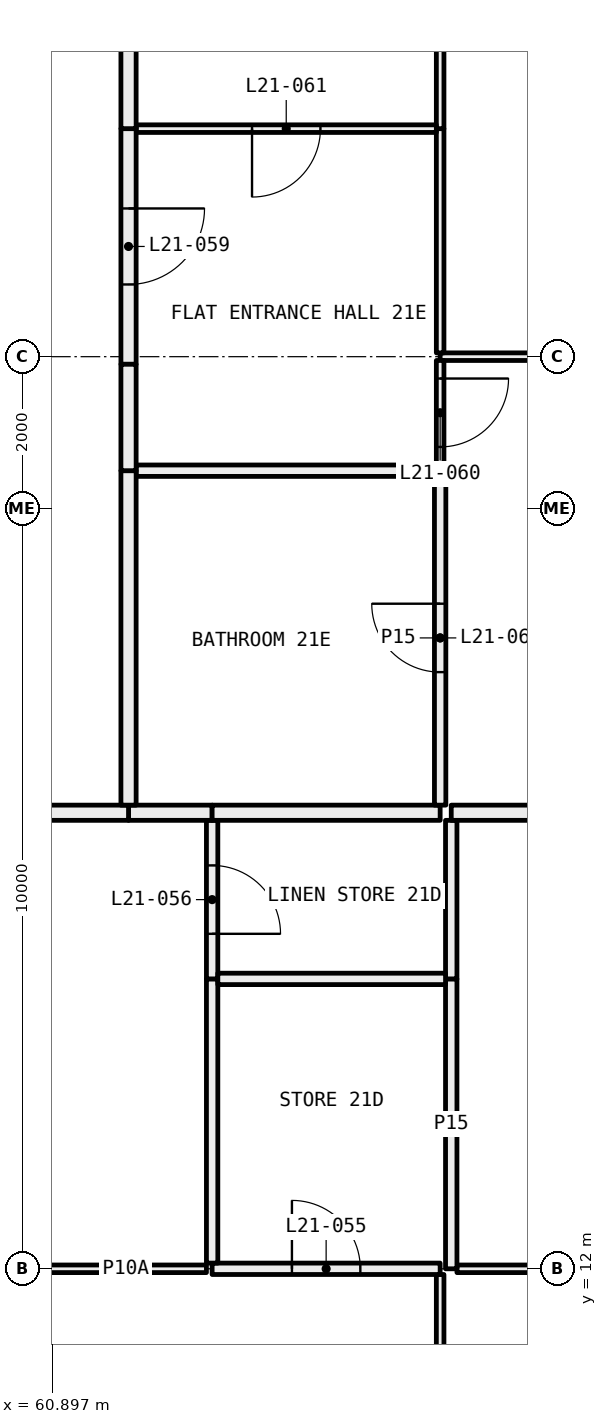
"""IFC4 building model, lengths in metres.
Left out: names, types, materials, properties, quantities, classifications, styles, units other than length and angle.
Written with IfcOpenShell. Run it as: python <this file> out.ifc"""

import sys

from ifc_helpers import new_model, si_unit, direction, frame, frame_2d, origin, place, context, subcontext, project, spatial, rectangle, extrude, element, fill, save


model = new_model("IFC4")
c1 = context("Model", 3, precision=1e-05, world=origin(), true_north=direction((0.0, 1.0)))
c2 = subcontext(c1, "Body", "Model", "MODEL_VIEW")
j1 = project(units=[si_unit("LENGTHUNIT", "METRE"), si_unit("PLANEANGLEUNIT", "RADIAN")], contexts=[c1])
p1 = place(None, origin())
s1 = spatial("IfcSite", under=j1, at=p1, CompositionType="ELEMENT")
p2 = place(p1, origin())
s2 = spatial("IfcBuilding", under=s1, at=p2, CompositionType="ELEMENT")
p3 = place(p2, frame((0.0, 0.0, 85.2)))
s3 = spatial("IfcBuildingStorey", under=s2, at=p3, CompositionType="ELEMENT", Elevation=85.2)
p4 = place(p3, frame((66.0, 6.72, 0.0), z_axis=(0.0, 0.0, 1.0), x_axis=(0.0, 1.0, 0.0)))
e1 = element("IfcWall", 1, at=p4, inside=s3, PredefinedType="PARTITIONING", context=c2, shape_type="SweptSolid", body=[
    extrude(rectangle(XDim=5.205, YDim=0.1, at=frame_2d((2.603, 0.0))), origin(), (0.0, 0.0, 1.0), 2.45),
])
p5 = place(p4, frame((2.153, 0.0, 0.0)))
e2 = element("IfcOpeningElement", 2, at=p5, cuts=e1, PredefinedType="OPENING", context=c2, shape_type="SweptSolid", body=[
    extrude(rectangle(XDim=0.9, YDim=2.1, at=frame_2d((0.45, 1.05))), frame((0.0, 0.06, 0.0), z_axis=(0.0, -1.0, 0.0), x_axis=(1.0, 0.0, 0.0)), (0.0, 0.0, 1.0), 0.12),
])
p6 = place(p3, frame((62.925, 12.0, 0.0), z_axis=(0.0, 0.0, 1.0), x_axis=(-1.0, 0.0, 0.0)))
e3 = element("IfcWall", 3, at=p6, inside=s3, PredefinedType="PARTITIONING", context=c2, shape_type="SweptSolid", body=[
    extrude(rectangle(XDim=2.125, YDim=0.1, at=frame_2d((1.062, 0.0))), origin(), (0.0, 0.0, 1.0), 2.45),
])
p7 = place(p3, frame((66.0, 12.0, 0.0), z_axis=(0.0, 0.0, 1.0), x_axis=(-1.0, 0.0, 0.0)))
e4 = element("IfcWall", 4, at=p7, inside=s3, PredefinedType="PARTITIONING", context=c2, shape_type="SweptSolid", body=[
    extrude(rectangle(XDim=3.0, YDim=0.15, at=frame_2d((1.5, 0.0))), origin(), (0.0, 0.0, 1.0), 2.45),
])
p8 = place(p7, frame((1.05, 0.0, 0.0)))
e5 = element("IfcOpeningElement", 5, at=p8, cuts=e4, PredefinedType="OPENING", context=c2, shape_type="SweptSolid", body=[
    extrude(rectangle(XDim=0.9, YDim=2.1, at=frame_2d((0.45, 1.05))), frame((0.0, 0.085, 0.0), z_axis=(0.0, -1.0, 0.0), x_axis=(1.0, 0.0, 0.0)), (0.0, 0.0, 1.0), 0.17),
])
p9 = place(p3, frame((71.28, 12.0, 0.0), z_axis=(0.0, 0.0, 1.0), x_axis=(-1.0, 0.0, 0.0)))
e6 = element("IfcWall", 6, at=p9, inside=s3, PredefinedType="PARTITIONING", context=c2, shape_type="SweptSolid", body=[
    extrude(rectangle(XDim=5.059, YDim=0.1, at=frame_2d((2.53, 0.0))), origin(), (0.0, 0.0, 1.0), 2.45),
])
p10 = place(p9, frame((2.08, 0.0, 0.0)))
e7 = element("IfcOpeningElement", 7, at=p10, cuts=e6, PredefinedType="OPENING", context=c2, shape_type="SweptSolid", body=[
    extrude(rectangle(XDim=0.9, YDim=2.1, at=frame_2d((0.45, 1.05))), frame((0.0, 0.06, 0.0), z_axis=(0.0, -1.0, 0.0), x_axis=(1.0, 0.0, 0.0)), (0.0, 0.0, 1.0), 0.12),
])
p11 = place(p3, frame((63.0, 12.075, 0.0), z_axis=(0.0, 0.0, 1.0), x_axis=(0.0, 1.0, 0.0)))
e8 = element("IfcWall", 8, at=p11, inside=s3, PredefinedType="PARTITIONING", context=c2, shape_type="SweptSolid", body=[
    extrude(rectangle(XDim=3.739, YDim=0.15, at=frame_2d((1.87, 0.0))), origin(), (0.0, 0.0, 1.0), 2.45),
])
p12 = place(p3, frame((63.0, 15.814, 0.0), z_axis=(0.0, 0.0, 1.0), x_axis=(0.0, 1.0, 0.0)))
e9 = element("IfcWall", 9, at=p12, inside=s3, PredefinedType="PARTITIONING", context=c2, shape_type="SweptSolid", body=[
    extrude(rectangle(XDim=2.086, YDim=0.15, at=frame_2d((1.043, 0.0))), origin(), (0.0, 0.0, 1.0), 3.05),
])
p13 = place(p12, frame((0.593, 0.0, 0.0)))
e10 = element("IfcOpeningElement", 10, at=p13, cuts=e9, PredefinedType="OPENING", context=c2, shape_type="SweptSolid", body=[
    extrude(rectangle(XDim=0.9, YDim=2.1, at=frame_2d((0.45, 1.05))), frame((0.0, 0.085, 0.0), z_axis=(0.0, -1.0, 0.0), x_axis=(1.0, 0.0, 0.0)), (0.0, 0.0, 1.0), 0.17),
])
p14 = place(p3, frame((63.0, 18.0, 0.0), z_axis=(0.0, 0.0, 1.0), x_axis=(-1.0, 0.0, 0.0)))
e11 = element("IfcWall", 11, at=p14, inside=s3, PredefinedType="PARTITIONING", context=c2, shape_type="SweptSolid", body=[
    extrude(rectangle(XDim=1.1, YDim=0.2, at=frame_2d((0.55, 0.0))), origin(), (0.0, 0.0, 1.0), 3.05),
])
p15 = place(p3, frame((61.9, 18.0, 0.0), z_axis=(0.0, 0.0, 1.0), x_axis=(-1.0, 0.0, 0.0)))
e12 = element("IfcWall", 12, at=p15, inside=s3, PredefinedType="PARTITIONING", context=c2, shape_type="SweptSolid", body=[
    extrude(rectangle(XDim=7.9, YDim=0.2, at=frame_2d((3.95, 0.0))), origin(), (0.0, 0.0, 1.0), 3.05),
])
p16 = place(p3, frame((66.146, 15.814, 0.0), z_axis=(0.0, 0.0, 1.0), x_axis=(0.0, -1.0, 0.0)))
e13 = element("IfcWall", 13, at=p16, inside=s3, PredefinedType="PARTITIONING", context=c2, shape_type="SweptSolid", body=[
    extrude(rectangle(XDim=3.814, YDim=0.15, at=frame_2d((1.907, 0.0))), origin(), (0.0, 0.0, 1.0), 2.45),
])
p17 = place(p3, frame((66.146, 17.9, 0.0), z_axis=(0.0, 0.0, 1.0), x_axis=(0.0, -1.0, 0.0)))
e14 = element("IfcWall", 14, at=p17, inside=s3, PredefinedType="PARTITIONING", context=c2, shape_type="SweptSolid", body=[
    extrude(rectangle(XDim=2.086, YDim=0.15, at=frame_2d((1.043, 0.0))), origin(), (0.0, 0.0, 1.0), 2.55),
])
p18 = place(p3, frame((71.28, 18.0, 0.0), z_axis=(0.0, 0.0, 1.0), x_axis=(-1.0, 0.0, 0.0)))
e15 = element("IfcWall", 15, at=p18, inside=s3, PredefinedType="PARTITIONING", context=c2, shape_type="SweptSolid", body=[
    extrude(rectangle(XDim=5.134, YDim=0.2, at=frame_2d((2.567, 0.0))), origin(), (0.0, 0.0, 1.0), 3.05),
])
p19 = place(p3, frame((66.071, 15.814, 0.0), z_axis=(0.0, 0.0, 1.0), x_axis=(-1.0, 0.0, 0.0)))
e16 = element("IfcWall", 16, at=p19, inside=s3, PredefinedType="PARTITIONING", context=c2, shape_type="SweptSolid", body=[
    extrude(rectangle(XDim=2.996, YDim=0.15, at=frame_2d((1.498, 0.0))), origin(), (0.0, 0.0, 1.0), 3.05),
])
p20 = place(p3, frame((66.0, 18.0, 0.0), z_axis=(0.0, 0.0, 1.0), x_axis=(-1.0, 0.0, 0.0)))
e17 = element("IfcWall", 17, at=p20, inside=s3, PredefinedType="PARTITIONING", context=c2, shape_type="SweptSolid", body=[
    extrude(rectangle(XDim=3.0, YDim=0.2, at=frame_2d((1.5, 0.0))), origin(), (0.0, 0.0, 1.0), 3.05),
])
p21 = place(p3, frame((71.28, 24.0, 0.0), z_axis=(0.0, 0.0, 1.0), x_axis=(-1.0, 0.0, 0.0)))
e18 = element("IfcWall", 18, at=p21, inside=s3, PredefinedType="PARTITIONING", context=c2, shape_type="SweptSolid", body=[
    extrude(rectangle(XDim=5.28, YDim=0.1, at=frame_2d((2.64, 0.0))), origin(), (0.0, 0.0, 1.0), 2.45),
])
p22 = place(p21, frame((2.19, 0.0, 0.0)))
e19 = element("IfcOpeningElement", 19, at=p22, cuts=e18, PredefinedType="OPENING", context=c2, shape_type="SweptSolid", body=[
    extrude(rectangle(XDim=0.9, YDim=2.1, at=frame_2d((0.45, 1.05))), frame((0.0, 0.06, 0.0), z_axis=(0.0, -1.0, 0.0), x_axis=(1.0, 0.0, 0.0)), (0.0, 0.0, 1.0), 0.12),
])
p23 = place(p3, frame((66.0, 22.5, 0.0), z_axis=(0.0, 0.0, 1.0), x_axis=(0.0, -1.0, 0.0)))
e20 = element("IfcWall", 20, at=p23, inside=s3, PredefinedType="PARTITIONING", context=c2, shape_type="SweptSolid", body=[
    extrude(rectangle(XDim=4.4, YDim=0.15, at=frame_2d((2.2, 0.0))), origin(), (0.0, 0.0, 1.0), 3.05),
])
p24 = place(p23, frame((1.75, 0.0, 0.0)))
e21 = element("IfcOpeningElement", 21, at=p24, cuts=e20, PredefinedType="OPENING", context=c2, shape_type="SweptSolid", body=[
    extrude(rectangle(XDim=0.9, YDim=2.1, at=frame_2d((0.45, 1.05))), frame((0.0, 0.085, 0.0), z_axis=(0.0, -1.0, 0.0), x_axis=(1.0, 0.0, 0.0)), (0.0, 0.0, 1.0), 0.17),
])
p25 = place(p3, frame((66.0, 23.95, 0.0), z_axis=(0.0, 0.0, 1.0), x_axis=(0.0, -1.0, 0.0)))
e22 = element("IfcWall", 22, at=p25, inside=s3, PredefinedType="PARTITIONING", context=c2, shape_type="SweptSolid", body=[
    extrude(rectangle(XDim=1.375, YDim=0.1, at=frame_2d((0.688, 0.0))), origin(), (0.0, 0.0, 1.0), 2.45),
])
p26 = place(p25, frame((0.238, 0.0, 0.0)))
e23 = element("IfcOpeningElement", 23, at=p26, cuts=e22, PredefinedType="OPENING", context=c2, shape_type="SweptSolid", body=[
    extrude(rectangle(XDim=0.9, YDim=2.1, at=frame_2d((0.45, 1.05))), frame((0.0, 0.06, 0.0), z_axis=(0.0, -1.0, 0.0), x_axis=(1.0, 0.0, 0.0)), (0.0, 0.0, 1.0), 0.12),
])
p27 = place(p3, frame((66.0, 27.0, 0.0), z_axis=(0.0, 0.0, 1.0), x_axis=(0.0, -1.0, 0.0)))
e24 = element("IfcWall", 24, at=p27, inside=s3, PredefinedType="PARTITIONING", context=c2, shape_type="SweptSolid", body=[
    extrude(rectangle(XDim=2.95, YDim=0.1, at=frame_2d((1.475, 0.0))), origin(), (0.0, 0.0, 1.0), 2.45),
])
p28 = place(p3, frame((66.0, 29.95, 0.0), z_axis=(0.0, 0.0, 1.0), x_axis=(0.0, -1.0, 0.0)))
e25 = element("IfcWall", 25, at=p28, inside=s3, PredefinedType="PARTITIONING", context=c2, shape_type="SweptSolid", body=[
    extrude(rectangle(XDim=2.95, YDim=0.1, at=frame_2d((1.475, 0.0))), origin(), (0.0, 0.0, 1.0), 3.05),
])
p29 = place(p3, frame((65.925, 22.5, 0.0), z_axis=(0.0, 0.0, 1.0), x_axis=(-1.0, 0.0, 0.0)))
e26 = element("IfcWall", 26, at=p29, inside=s3, PredefinedType="PARTITIONING", context=c2, shape_type="SweptSolid", body=[
    extrude(rectangle(XDim=3.925, YDim=0.15, at=frame_2d((1.962, 0.0))), origin(), (0.0, 0.0, 1.0), 3.05),
])
p30 = place(p3, frame((61.9, 22.5, 0.0), z_axis=(0.0, 0.0, 1.0), x_axis=(0.0, -1.0, 0.0)))
e27 = element("IfcWall", 27, at=p30, inside=s3, PredefinedType="PARTITIONING", context=c2, shape_type="SweptSolid", body=[
    extrude(rectangle(XDim=4.4, YDim=0.2, at=frame_2d((2.2, 0.0))), origin(), (0.0, 0.0, 1.0), 3.05),
])
p31 = place(p3, frame((65.95, 27.0, 0.0), z_axis=(0.0, 0.0, 1.0), x_axis=(-1.0, 0.0, 0.0)))
e28 = element("IfcWall", 28, at=p31, inside=s3, PredefinedType="PARTITIONING", context=c2, shape_type="SweptSolid", body=[
    extrude(rectangle(XDim=3.95, YDim=0.1, at=frame_2d((1.975, 0.0))), origin(), (0.0, 0.0, 1.0), 3.05),
])
p32 = place(p31, frame((1.525, 0.0, 0.0)))
e29 = element("IfcOpeningElement", 29, at=p32, cuts=e28, PredefinedType="OPENING", context=c2, shape_type="SweptSolid", body=[
    extrude(rectangle(XDim=0.9, YDim=2.1, at=frame_2d((0.45, 1.05))), frame((0.0, 0.06, 0.0), z_axis=(0.0, -1.0, 0.0), x_axis=(1.0, 0.0, 0.0)), (0.0, 0.0, 1.0), 0.12),
])
p33 = place(p3, frame((61.9, 27.0, 0.0), z_axis=(0.0, 0.0, 1.0), x_axis=(0.0, -1.0, 0.0)))
e30 = element("IfcWall", 30, at=p33, inside=s3, PredefinedType="PARTITIONING", context=c2, shape_type="SweptSolid", body=[
    extrude(rectangle(XDim=3.1, YDim=0.2, at=frame_2d((1.55, 0.0))), origin(), (0.0, 0.0, 1.0), 2.45),
])
p34 = place(p33, frame((1.05, 0.0, 0.0)))
e31 = element("IfcOpeningElement", 31, at=p34, cuts=e30, PredefinedType="OPENING", context=c2, shape_type="SweptSolid", body=[
    extrude(rectangle(XDim=1.0, YDim=2.1, at=frame_2d((0.5, 1.05))), frame((0.0, 0.11, 0.0), z_axis=(0.0, -1.0, 0.0), x_axis=(1.0, 0.0, 0.0)), (0.0, 0.0, 1.0), 0.22),
])
p35 = place(p3, frame((61.9, 23.9, 0.0), z_axis=(0.0, 0.0, 1.0), x_axis=(0.0, -1.0, 0.0)))
e32 = element("IfcWall", 32, at=p35, inside=s3, PredefinedType="PARTITIONING", context=c2, shape_type="SweptSolid", body=[
    extrude(rectangle(XDim=1.4, YDim=0.2, at=frame_2d((0.7, 0.0))), origin(), (0.0, 0.0, 1.0), 3.05),
])
p36 = place(p3, frame((61.9, 35.9, 0.0), z_axis=(0.0, 0.0, 1.0), x_axis=(0.0, -1.0, 0.0)))
e33 = element("IfcWall", 33, at=p36, inside=s3, PredefinedType="PARTITIONING", context=c2, shape_type="SweptSolid", body=[
    extrude(rectangle(XDim=8.9, YDim=0.2, at=frame_2d((4.45, 0.0))), origin(), (0.0, 0.0, 1.0), 3.05),
])
p37 = place(p8, frame((0.9, 0.0, 0.0), x_axis=(-1.0, 0.0, 0.0)))
e34 = element("IfcDoor", 34, at=p37, inside=s3, OperationType="SINGLE_SWING_RIGHT", PredefinedType="DOOR", context=c2, shape_type="SweptSolid", body=[
    extrude(rectangle(XDim=0.9, YDim=2.1, at=frame_2d((0.45, 1.05))), frame((0.0, 0.025, 0.0), z_axis=(0.0, -1.0, 0.0), x_axis=(1.0, 0.0, 0.0)), (0.0, 0.0, 1.0), 0.05),
])
fill(e5, e34)
p38 = place(p13, frame((0.9, 0.0, 0.0), x_axis=(-1.0, 0.0, 0.0)))
e35 = element("IfcDoor", 35, at=p38, inside=s3, OperationType="SINGLE_SWING_LEFT", PredefinedType="DOOR", context=c2, shape_type="SweptSolid", body=[
    extrude(rectangle(XDim=0.9, YDim=2.1, at=frame_2d((0.45, 1.05))), frame((0.0, 0.025, 0.0), z_axis=(0.0, -1.0, 0.0), x_axis=(1.0, 0.0, 0.0)), (0.0, 0.0, 1.0), 0.05),
])
fill(e10, e35)
p39 = place(p34, origin())
e36 = element("IfcDoor", 36, at=p39, inside=s3, OperationType="SINGLE_SWING_RIGHT", PredefinedType="DOOR", context=c2, shape_type="SweptSolid", body=[
    extrude(rectangle(XDim=1.0, YDim=2.1, at=frame_2d((0.5, 1.05))), frame((0.0, 0.025, 0.0), z_axis=(0.0, -1.0, 0.0), x_axis=(1.0, 0.0, 0.0)), (0.0, 0.0, 1.0), 0.05),
])
fill(e31, e36)
p40 = place(p26, origin())
e37 = element("IfcDoor", 37, at=p40, inside=s3, OperationType="SINGLE_SWING_RIGHT", PredefinedType="DOOR", context=c2, shape_type="SweptSolid", body=[
    extrude(rectangle(XDim=0.9, YDim=2.1, at=frame_2d((0.45, 1.05))), frame((0.0, 0.025, 0.0), z_axis=(0.0, -1.0, 0.0), x_axis=(1.0, 0.0, 0.0)), (0.0, 0.0, 1.0), 0.05),
])
fill(e23, e37)
p41 = place(p32, origin())
e38 = element("IfcDoor", 38, at=p41, inside=s3, OperationType="SINGLE_SWING_LEFT", PredefinedType="DOOR", context=c2, shape_type="SweptSolid", body=[
    extrude(rectangle(XDim=0.9, YDim=2.1, at=frame_2d((0.45, 1.05))), frame((0.0, 0.025, 0.0), z_axis=(0.0, -1.0, 0.0), x_axis=(1.0, 0.0, 0.0)), (0.0, 0.0, 1.0), 0.05),
])
fill(e29, e38)
p42 = place(p24, frame((0.9, 0.0, 0.0), x_axis=(-1.0, 0.0, 0.0)))
e39 = element("IfcDoor", 39, at=p42, inside=s3, OperationType="SINGLE_SWING_LEFT", PredefinedType="DOOR", context=c2, shape_type="SweptSolid", body=[
    extrude(rectangle(XDim=0.9, YDim=2.1, at=frame_2d((0.45, 1.05))), frame((0.0, 0.025, 0.0), z_axis=(0.0, -1.0, 0.0), x_axis=(1.0, 0.0, 0.0)), (0.0, 0.0, 1.0), 0.05),
])
fill(e21, e39)
save(model, sys.argv[1])
